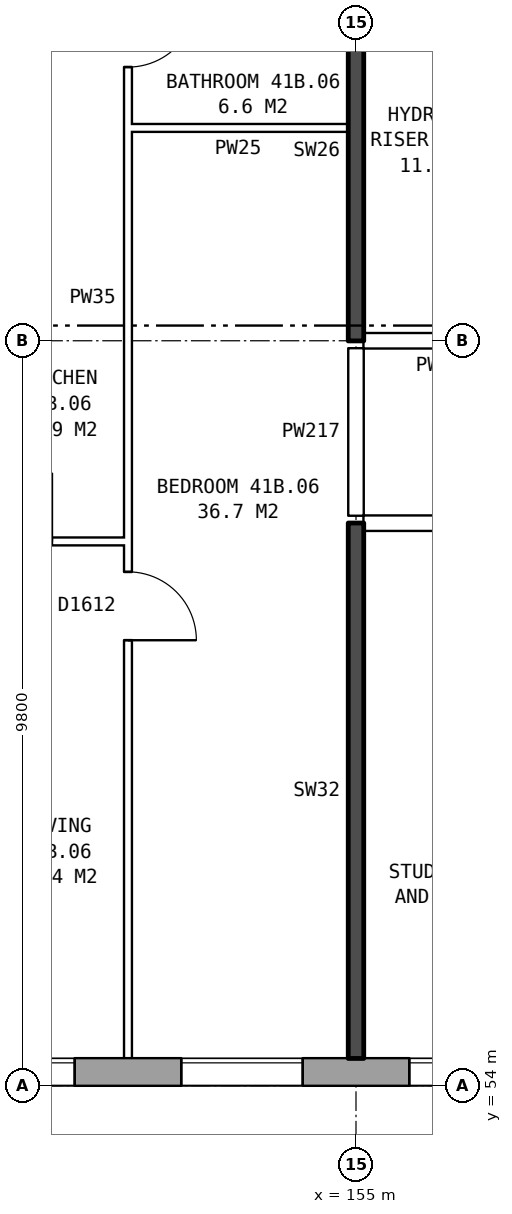
"""IFC4 building model, lengths in metres.
Left out: names, types, materials, properties, quantities, classifications, styles, units other than length and angle.
Written with IfcOpenShell. Run it as: python <this file> out.ifc"""

import sys

from ifc_helpers import new_model, si_unit, direction, frame, frame_2d, origin, place, context, subcontext, project, spatial, rectangle, extrude, element, fill, save


model = new_model("IFC4")
c1 = context("Model", 3, precision=1e-05, world=origin(), true_north=direction((0.0, 1.0)))
c2 = subcontext(c1, "Body", "Model", "MODEL_VIEW")
j1 = project(units=[si_unit("LENGTHUNIT", "METRE"), si_unit("PLANEANGLEUNIT", "RADIAN")], contexts=[c1])
p1 = place(None, origin())
s1 = spatial("IfcSite", under=j1, at=p1, CompositionType="ELEMENT")
p2 = place(p1, origin())
s2 = spatial("IfcBuilding", under=s1, at=p2, CompositionType="ELEMENT")
p3 = place(p2, frame((0.0, 0.0, 148.5)))
s3 = spatial("IfcBuildingStorey", under=s2, at=p3, CompositionType="ELEMENT", Elevation=148.5)
p4 = place(p3, frame((134.075, 54.18, 0.0), z_axis=(0.0, 0.0, 1.0), x_axis=(1.0, 0.0, 0.0)))
e1 = element("IfcWall", 1, at=p4, inside=s3, PredefinedType="STANDARD", context=c2, shape_type="SweptSolid", body=[
    extrude(rectangle(XDim=34.351, YDim=0.36, at=frame_2d((17.175, 0.0))), origin(), (0.0, 0.0, 1.0), 2.85),
])
p5 = place(p4, frame((0.625, 0.0, 0.8)))
e2 = element("IfcOpeningElement", 2, at=p5, cuts=e1, PredefinedType="OPENING", context=c2, shape_type="SweptSolid", body=[
    extrude(rectangle(XDim=1.6, YDim=1.8, at=frame_2d((0.8, 0.9))), frame((0.0, 0.19, 0.0), z_axis=(0.0, -1.0, 0.0), x_axis=(1.0, 0.0, 0.0)), (0.0, 0.0, 1.0), 0.38),
])
p6 = place(p4, frame((3.625, 0.0, 0.8)))
e3 = element("IfcOpeningElement", 3, at=p6, cuts=e1, PredefinedType="OPENING", context=c2, shape_type="SweptSolid", body=[
    extrude(rectangle(XDim=1.6, YDim=1.8, at=frame_2d((0.8, 0.9))), frame((0.0, 0.19, 0.0), z_axis=(0.0, -1.0, 0.0), x_axis=(1.0, 0.0, 0.0)), (0.0, 0.0, 1.0), 0.38),
])
p7 = place(p4, frame((6.625, 0.0, 0.8)))
e4 = element("IfcOpeningElement", 4, at=p7, cuts=e1, PredefinedType="OPENING", context=c2, shape_type="SweptSolid", body=[
    extrude(rectangle(XDim=1.6, YDim=1.8, at=frame_2d((0.8, 0.9))), frame((0.0, 0.19, 0.0), z_axis=(0.0, -1.0, 0.0), x_axis=(1.0, 0.0, 0.0)), (0.0, 0.0, 1.0), 0.38),
])
p8 = place(p4, frame((9.625, 0.0, 0.8)))
e5 = element("IfcOpeningElement", 5, at=p8, cuts=e1, PredefinedType="OPENING", context=c2, shape_type="SweptSolid", body=[
    extrude(rectangle(XDim=1.6, YDim=1.8, at=frame_2d((0.8, 0.9))), frame((0.0, 0.19, 0.0), z_axis=(0.0, -1.0, 0.0), x_axis=(1.0, 0.0, 0.0)), (0.0, 0.0, 1.0), 0.38),
])
p9 = place(p4, frame((12.625, 0.0, 0.8)))
e6 = element("IfcOpeningElement", 6, at=p9, cuts=e1, PredefinedType="OPENING", context=c2, shape_type="SweptSolid", body=[
    extrude(rectangle(XDim=1.6, YDim=1.8, at=frame_2d((0.8, 0.9))), frame((0.0, 0.19, 0.0), z_axis=(0.0, -1.0, 0.0), x_axis=(1.0, 0.0, 0.0)), (0.0, 0.0, 1.0), 0.38),
])
p10 = place(p4, frame((15.625, 0.0, 0.8)))
e7 = element("IfcOpeningElement", 7, at=p10, cuts=e1, PredefinedType="OPENING", context=c2, shape_type="SweptSolid", body=[
    extrude(rectangle(XDim=1.6, YDim=1.8, at=frame_2d((0.8, 0.9))), frame((0.0, 0.19, 0.0), z_axis=(0.0, -1.0, 0.0), x_axis=(1.0, 0.0, 0.0)), (0.0, 0.0, 1.0), 0.38),
])
p11 = place(p4, frame((18.625, 0.0, 0.8)))
e8 = element("IfcOpeningElement", 8, at=p11, cuts=e1, PredefinedType="OPENING", context=c2, shape_type="SweptSolid", body=[
    extrude(rectangle(XDim=1.6, YDim=1.8, at=frame_2d((0.8, 0.9))), frame((0.0, 0.19, 0.0), z_axis=(0.0, -1.0, 0.0), x_axis=(1.0, 0.0, 0.0)), (0.0, 0.0, 1.0), 0.38),
])
p12 = place(p4, frame((21.625, 0.0, 0.8)))
e9 = element("IfcOpeningElement", 9, at=p12, cuts=e1, PredefinedType="OPENING", context=c2, shape_type="SweptSolid", body=[
    extrude(rectangle(XDim=1.6, YDim=1.8, at=frame_2d((0.8, 0.9))), frame((0.0, 0.19, 0.0), z_axis=(0.0, -1.0, 0.0), x_axis=(1.0, 0.0, 0.0)), (0.0, 0.0, 1.0), 0.38),
])
p13 = place(p4, frame((24.625, 0.0, 0.8)))
e10 = element("IfcOpeningElement", 10, at=p13, cuts=e1, PredefinedType="OPENING", context=c2, shape_type="SweptSolid", body=[
    extrude(rectangle(XDim=1.6, YDim=1.8, at=frame_2d((0.8, 0.9))), frame((0.0, 0.19, 0.0), z_axis=(0.0, -1.0, 0.0), x_axis=(1.0, 0.0, 0.0)), (0.0, 0.0, 1.0), 0.38),
])
p14 = place(p4, frame((27.625, 0.0, 0.8)))
e11 = element("IfcOpeningElement", 11, at=p14, cuts=e1, PredefinedType="OPENING", context=c2, shape_type="SweptSolid", body=[
    extrude(rectangle(XDim=1.6, YDim=1.8, at=frame_2d((0.8, 0.9))), frame((0.0, 0.19, 0.0), z_axis=(0.0, -1.0, 0.0), x_axis=(1.0, 0.0, 0.0)), (0.0, 0.0, 1.0), 0.38),
])
p15 = place(p4, frame((30.625, 0.0, 0.8)))
e12 = element("IfcOpeningElement", 12, at=p15, cuts=e1, PredefinedType="OPENING", context=c2, shape_type="SweptSolid", body=[
    extrude(rectangle(XDim=1.6, YDim=1.8, at=frame_2d((0.8, 0.9))), frame((0.0, 0.19, 0.0), z_axis=(0.0, -1.0, 0.0), x_axis=(1.0, 0.0, 0.0)), (0.0, 0.0, 1.0), 0.38),
])
p16 = place(p3, frame((149.1, 61.16, 0.0), z_axis=(0.0, 0.0, 1.0), x_axis=(1.0, 0.0, 0.0)))
e13 = element("IfcWall", 13, at=p16, inside=s3, PredefinedType="PARTITIONING", context=c2, shape_type="SweptSolid", body=[
    extrude(rectangle(XDim=2.9, YDim=0.1, at=frame_2d((1.45, 0.0))), origin(), (0.0, 0.0, 1.0), 2.85),
])
p17 = place(p16, frame((1.0, 0.0, 0.0)))
e14 = element("IfcOpeningElement", 14, at=p17, cuts=e13, PredefinedType="OPENING", context=c2, shape_type="SweptSolid", body=[
    extrude(rectangle(XDim=0.9, YDim=2.1, at=frame_2d((0.45, 1.05))), frame((0.0, 0.06, 0.0), z_axis=(0.0, -1.0, 0.0), x_axis=(1.0, 0.0, 0.0)), (0.0, 0.0, 1.0), 0.12),
])
p18 = place(p3, frame((155.1, 61.4, 0.0), z_axis=(0.0, 0.0, 1.0), x_axis=(1.0, 0.0, 0.0)))
e15 = element("IfcWall", 15, at=p18, inside=s3, PredefinedType="PARTITIONING", context=c2, shape_type="SweptSolid", body=[
    extrude(rectangle(XDim=16.04, YDim=0.2, at=frame_2d((8.02, 0.0))), origin(), (0.0, 0.0, 1.0), 2.85),
])
p19 = place(p18, frame((1.45, 0.0, 0.0)))
e16 = element("IfcOpeningElement", 16, at=p19, cuts=e15, PredefinedType="OPENING", context=c2, shape_type="SweptSolid", body=[
    extrude(rectangle(XDim=1.0, YDim=2.1, at=frame_2d((0.5, 1.05))), frame((0.0, 0.11, 0.0), z_axis=(0.0, -1.0, 0.0), x_axis=(1.0, 0.0, 0.0)), (0.0, 0.0, 1.0), 0.22),
])
p20 = place(p18, frame((8.4, 0.0, 0.0)))
e17 = element("IfcOpeningElement", 17, at=p20, cuts=e15, PredefinedType="OPENING", context=c2, shape_type="SweptSolid", body=[
    extrude(rectangle(XDim=1.0, YDim=2.1, at=frame_2d((0.5, 1.05))), frame((0.0, 0.11, 0.0), z_axis=(0.0, -1.0, 0.0), x_axis=(1.0, 0.0, 0.0)), (0.0, 0.0, 1.0), 0.22),
])
p21 = place(p3, frame((155.1, 63.8, 0.0), z_axis=(0.0, 0.0, 1.0), x_axis=(1.0, 0.0, 0.0)))
e18 = element("IfcWall", 18, at=p21, inside=s3, PredefinedType="PARTITIONING", context=c2, shape_type="SweptSolid", body=[
    extrude(rectangle(XDim=2.14, YDim=0.2, at=frame_2d((1.07, 0.0))), origin(), (0.0, 0.0, 1.0), 2.85),
])
p22 = place(p3, frame((152.0, 66.6, 0.0), z_axis=(0.0, 0.0, 1.0), x_axis=(1.0, 0.0, 0.0)))
e19 = element("IfcWall", 19, at=p22, inside=s3, PredefinedType="PARTITIONING", context=c2, shape_type="SweptSolid", body=[
    extrude(rectangle(XDim=2.9, YDim=0.1, at=frame_2d((1.45, 0.0))), origin(), (0.0, 0.0, 1.0), 2.85),
])
p23 = place(p3, frame((152.0, 54.36, 0.0), z_axis=(0.0, 0.0, 1.0), x_axis=(0.0, 1.0, 0.0)))
e20 = element("IfcWall", 20, at=p23, inside=s3, PredefinedType="PARTITIONING", context=c2, shape_type="SweptSolid", body=[
    extrude(rectangle(XDim=14.34, YDim=0.1, at=frame_2d((7.17, 0.0))), origin(), (0.0, 0.0, 1.0), 2.85),
])
p24 = place(p23, frame((5.5, 0.0, 0.0)))
e21 = element("IfcOpeningElement", 21, at=p24, cuts=e20, PredefinedType="OPENING", context=c2, shape_type="SweptSolid", body=[
    extrude(rectangle(XDim=0.9, YDim=2.1, at=frame_2d((0.45, 1.05))), frame((0.0, 0.06, 0.0), z_axis=(0.0, -1.0, 0.0), x_axis=(1.0, 0.0, 0.0)), (0.0, 0.0, 1.0), 0.12),
])
p25 = place(p23, frame((13.04, 0.0, 0.0)))
e22 = element("IfcOpeningElement", 22, at=p25, cuts=e20, PredefinedType="OPENING", context=c2, shape_type="SweptSolid", body=[
    extrude(rectangle(XDim=0.9, YDim=2.1, at=frame_2d((0.45, 1.05))), frame((0.0, 0.06, 0.0), z_axis=(0.0, -1.0, 0.0), x_axis=(1.0, 0.0, 0.0)), (0.0, 0.0, 1.0), 0.12),
])
p26 = place(p3, frame((155.0, 54.36, 0.0), z_axis=(0.0, 0.0, 1.0), x_axis=(0.0, 1.0, 0.0)))
e23 = element("IfcWall", 23, at=p26, inside=s3, PredefinedType="SOLIDWALL", context=c2, shape_type="SweptSolid", body=[
    extrude(rectangle(XDim=7.04, YDim=0.2, at=frame_2d((3.52, 0.0))), origin(), (0.0, 0.0, 1.0), 2.85),
])
p27 = place(p3, frame((155.0, 61.5, 0.0), z_axis=(0.0, 0.0, 1.0), x_axis=(0.0, 1.0, 0.0)))
e24 = element("IfcWall", 24, at=p27, inside=s3, PredefinedType="PARTITIONING", context=c2, shape_type="SweptSolid", body=[
    extrude(rectangle(XDim=2.2, YDim=0.2, at=frame_2d((1.1, 0.0))), origin(), (0.0, 0.0, 1.0), 2.85),
])
p28 = place(p3, frame((155.0, 63.8, 0.0), z_axis=(0.0, 0.0, 1.0), x_axis=(0.0, 1.0, 0.0)))
e25 = element("IfcWall", 25, at=p28, inside=s3, PredefinedType="SOLIDWALL", context=c2, shape_type="SweptSolid", body=[
    extrude(rectangle(XDim=5.0, YDim=0.2, at=frame_2d((2.5, 0.0))), origin(), (0.0, 0.0, 1.0), 2.85),
])
p29 = place(p10, origin())
e26 = element("IfcWindow", 26, at=p29, inside=s3, PartitioningType="SINGLE_PANEL", PredefinedType="WINDOW", context=c2, shape_type="SweptSolid", body=[
    extrude(rectangle(XDim=1.6, YDim=1.8, at=frame_2d((0.8, 0.9))), frame((0.0, 0.15, 0.0), z_axis=(0.0, -1.0, 0.0), x_axis=(1.0, 0.0, 0.0)), (0.0, 0.0, 1.0), 0.06),
])
fill(e7, e26)
p30 = place(p11, origin())
e27 = element("IfcWindow", 27, at=p30, inside=s3, PartitioningType="SINGLE_PANEL", PredefinedType="WINDOW", context=c2, shape_type="SweptSolid", body=[
    extrude(rectangle(XDim=1.6, YDim=1.8, at=frame_2d((0.8, 0.9))), frame((0.0, 0.15, 0.0), z_axis=(0.0, -1.0, 0.0), x_axis=(1.0, 0.0, 0.0)), (0.0, 0.0, 1.0), 0.06),
])
fill(e8, e27)
p31 = place(p12, origin())
e28 = element("IfcWindow", 28, at=p31, inside=s3, PartitioningType="SINGLE_PANEL", PredefinedType="WINDOW", context=c2, shape_type="SweptSolid", body=[
    extrude(rectangle(XDim=1.6, YDim=1.8, at=frame_2d((0.8, 0.9))), frame((0.0, 0.15, 0.0), z_axis=(0.0, -1.0, 0.0), x_axis=(1.0, 0.0, 0.0)), (0.0, 0.0, 1.0), 0.06),
])
fill(e9, e28)
p32 = place(p24, frame((0.9, 0.0, 0.0), z_axis=(0.0, 0.0, 1.0), x_axis=(-1.0, 0.0, 0.0)))
e29 = element("IfcDoor", 29, at=p32, inside=s3, OperationType="SINGLE_SWING_RIGHT", PredefinedType="DOOR", context=c2, shape_type="SweptSolid", body=[
    extrude(rectangle(XDim=0.9, YDim=2.1, at=frame_2d((0.45, 1.05))), frame((0.0, 0.025, 0.0), z_axis=(0.0, -1.0, 0.0), x_axis=(1.0, 0.0, 0.0)), (0.0, 0.0, 1.0), 0.05),
])
fill(e21, e29)
p33 = place(p25, frame((0.9, 0.0, 0.0), z_axis=(0.0, 0.0, 1.0), x_axis=(-1.0, 0.0, 0.0)))
e30 = element("IfcDoor", 30, at=p33, inside=s3, OperationType="SINGLE_SWING_LEFT", PredefinedType="DOOR", context=c2, shape_type="SweptSolid", body=[
    extrude(rectangle(XDim=0.9, YDim=2.1, at=frame_2d((0.45, 1.05))), frame((0.0, 0.025, 0.0), z_axis=(0.0, -1.0, 0.0), x_axis=(1.0, 0.0, 0.0)), (0.0, 0.0, 1.0), 0.05),
])
fill(e22, e30)
save(model, sys.argv[1])
